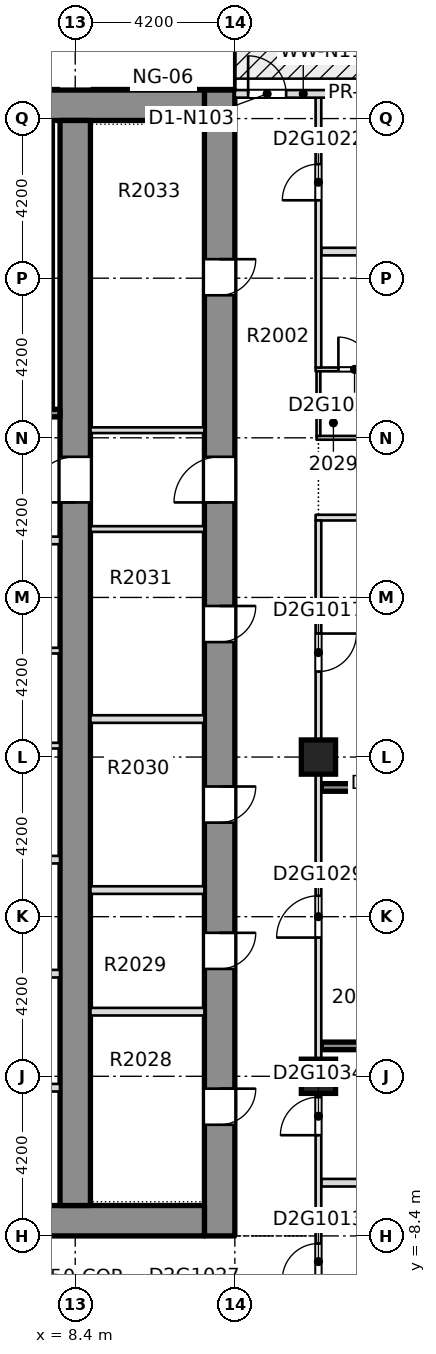
"""IFC4 building model, lengths in metres.
Left out: names, types, materials, properties, quantities, classifications, styles, units other than length and angle.
Written with IfcOpenShell. Run it as: python <this file> out.ifc"""

import sys

from ifc_helpers import new_model, si_unit, direction, frame, frame_2d, origin, origin_2d, place, context, subcontext, project, spatial, rectangle, extrude, element, fill, save


model = new_model("IFC4")
c1 = context("Model", 3, precision=1e-05, world=origin(), true_north=direction((0.0, 1.0)))
c2 = subcontext(c1, "Body", "Model", "MODEL_VIEW")
j1 = project(units=[si_unit("LENGTHUNIT", "METRE"), si_unit("PLANEANGLEUNIT", "RADIAN")], contexts=[c1])
p1 = place(None, origin())
s1 = spatial("IfcSite", under=j1, at=p1, CompositionType="ELEMENT")
p2 = place(p1, origin())
s2 = spatial("IfcBuilding", under=s1, at=p2, CompositionType="ELEMENT")
p3 = place(p2, frame((0.0, 0.0, 83.85)))
s3 = spatial("IfcBuildingStorey", under=s2, at=p3, CompositionType="ELEMENT", Elevation=83.85)
p4 = place(p3, frame((12.2, -8.4, -0.32), z_axis=(0.0, 0.0, 1.0), x_axis=(0.0, 1.0, 0.0)))
e1 = element("IfcWall", 1, at=p4, inside=s3, PredefinedType="SHEAR", context=c2, shape_type="SweptSolid", body=[
    extrude(rectangle(XDim=30.15, YDim=0.8, at=frame_2d((15.075, 0.0))), origin(), (0.0, 0.0, 1.0), 3.45),
])
p5 = place(p4, frame((2.925, 0.0, 0.32)))
e2 = element("IfcOpeningElement", 2, at=p5, cuts=e1, PredefinedType="OPENING", context=c2, shape_type="SweptSolid", body=[
    extrude(rectangle(XDim=0.95, YDim=2.1, at=frame_2d((0.475, 1.05))), frame((0.0, 0.41, 0.0), z_axis=(0.0, -1.0, 0.0), x_axis=(1.0, 0.0, 0.0)), (0.0, 0.0, 1.0), 0.82),
])
p6 = place(p4, frame((7.025, 0.0, 0.32)))
e3 = element("IfcOpeningElement", 3, at=p6, cuts=e1, PredefinedType="OPENING", context=c2, shape_type="SweptSolid", body=[
    extrude(rectangle(XDim=0.95, YDim=2.1, at=frame_2d((0.475, 1.05))), frame((0.0, 0.41, 0.0), z_axis=(0.0, -1.0, 0.0), x_axis=(1.0, 0.0, 0.0)), (0.0, 0.0, 1.0), 0.82),
])
p7 = place(p4, frame((10.875, 0.0, 0.32)))
e4 = element("IfcOpeningElement", 4, at=p7, cuts=e1, PredefinedType="OPENING", context=c2, shape_type="SweptSolid", body=[
    extrude(rectangle(XDim=0.95, YDim=2.1, at=frame_2d((0.475, 1.05))), frame((0.0, 0.41, 0.0), z_axis=(0.0, -1.0, 0.0), x_axis=(1.0, 0.0, 0.0)), (0.0, 0.0, 1.0), 0.82),
])
p8 = place(p4, frame((15.625, 0.0, 0.32)))
e5 = element("IfcOpeningElement", 5, at=p8, cuts=e1, PredefinedType="OPENING", context=c2, shape_type="SweptSolid", body=[
    extrude(rectangle(XDim=0.95, YDim=2.1, at=frame_2d((0.475, 1.05))), frame((0.0, 0.41, 0.0), z_axis=(0.0, -1.0, 0.0), x_axis=(1.0, 0.0, 0.0)), (0.0, 0.0, 1.0), 0.82),
])
p9 = place(p4, frame((24.75, 0.0, 0.32)))
e6 = element("IfcOpeningElement", 6, at=p9, cuts=e1, PredefinedType="OPENING", context=c2, shape_type="SweptSolid", body=[
    extrude(rectangle(XDim=0.95, YDim=2.1, at=frame_2d((0.475, 1.05))), frame((0.0, 0.41, 0.0), z_axis=(0.0, -1.0, 0.0), x_axis=(1.0, 0.0, 0.0)), (0.0, 0.0, 1.0), 0.82),
])
p10 = place(p4, frame((19.3, 0.0, 0.32)))
e7 = element("IfcOpeningElement", 7, at=p10, cuts=e1, PredefinedType="OPENING", context=c2, shape_type="SweptSolid", body=[
    extrude(rectangle(XDim=1.2, YDim=2.1, at=frame_2d((0.6, 1.05))), frame((0.0, 0.41, 0.0), z_axis=(0.0, -1.0, 0.0), x_axis=(1.0, 0.0, 0.0)), (0.0, 0.0, 1.0), 0.82),
])
p11 = place(p3, frame((-11.8, -8.0, -0.32), z_axis=(0.0, 0.0, 1.0), x_axis=(1.0, 0.0, 0.0)))
e8 = element("IfcWall", 8, at=p11, inside=s3, PredefinedType="SHEAR", context=c2, shape_type="SweptSolid", body=[
    extrude(rectangle(XDim=23.6, YDim=0.8, at=frame_2d((11.8, 0.0))), origin(), (0.0, 0.0, 1.0), 3.45),
])
p12 = place(p11, frame((7.05, 0.0, 0.32)))
e9 = element("IfcOpeningElement", 9, at=p12, cuts=e8, PredefinedType="OPENING", context=c2, shape_type="SweptSolid", body=[
    extrude(rectangle(XDim=1.8, YDim=2.1, at=frame_2d((0.9, 1.05))), frame((0.0, 0.41, 0.0), z_axis=(0.0, -1.0, 0.0), x_axis=(1.0, 0.0, 0.0)), (0.0, 0.0, 1.0), 0.82),
])
p13 = place(p11, frame((14.75, 0.0, 0.32)))
e10 = element("IfcOpeningElement", 10, at=p13, cuts=e8, PredefinedType="OPENING", context=c2, shape_type="SweptSolid", body=[
    extrude(rectangle(XDim=1.8, YDim=2.1, at=frame_2d((0.9, 1.05))), frame((0.0, 0.41, 0.0), z_axis=(0.0, -1.0, 0.0), x_axis=(1.0, 0.0, 0.0)), (0.0, 0.0, 1.0), 0.82),
])
p14 = place(p3, frame((-11.8, 21.35, -0.32), z_axis=(0.0, 0.0, 1.0), x_axis=(1.0, 0.0, 0.0)))
e11 = element("IfcWall", 11, at=p14, inside=s3, PredefinedType="SHEAR", context=c2, shape_type="SweptSolid", body=[
    extrude(rectangle(XDim=23.6, YDim=0.8, at=frame_2d((11.8, 0.0))), origin(), (0.0, 0.0, 1.0), 3.45),
])
p15 = place(p3, frame((8.4, -7.6, -0.32), z_axis=(0.0, 0.0, 1.0), x_axis=(0.0, 1.0, 0.0)))
e12 = element("IfcWall", 12, at=p15, inside=s3, PredefinedType="SHEAR", context=c2, shape_type="SweptSolid", body=[
    extrude(rectangle(XDim=28.55, YDim=0.8, at=frame_2d((14.275, 0.0))), origin(), (0.0, 0.0, 1.0), 3.45),
])
p16 = place(p15, frame((18.5, 0.0, 0.32)))
e13 = element("IfcOpeningElement", 13, at=p16, cuts=e12, PredefinedType="OPENING", context=c2, shape_type="SweptSolid", body=[
    extrude(rectangle(XDim=1.2, YDim=2.1, at=frame_2d((0.6, 1.05))), frame((0.0, 0.41, 0.0), z_axis=(0.0, -1.0, 0.0), x_axis=(1.0, 0.0, 0.0)), (0.0, 0.0, 1.0), 0.82),
])
for number, where, z_axis, x_axis in (
    (14, (14.8, -4.2, -0.32), (0.0, 0.0, 1.0), (1.0, 0.0, 0.0)),
    (15, (14.8, 4.2, -0.32), (0.0, 0.0, 1.0), (1.0, 0.0, 0.0)),
):
    element("IfcColumn", number, at=place(p3, frame(where, z_axis=z_axis, x_axis=x_axis)), inside=s3, PredefinedType="COLUMN", context=c2, shape_type="SweptSolid", body=[
        extrude(rectangle(XDim=0.9, YDim=0.9, at=origin_2d()), origin(), (0.0, 0.0, 1.0), 3.45),
    ])
p17 = place(p3, frame((14.875, -7.0, 0.0), z_axis=(0.0, 0.0, 1.0), x_axis=(1.0, 0.0, 0.0)))
e16 = element("IfcWall", 16, at=p17, inside=s3, PredefinedType="PARTITIONING", context=c2, shape_type="SweptSolid", body=[
    extrude(rectangle(XDim=10.875, YDim=0.2, at=frame_2d((5.438, 0.0))), origin(), (0.0, 0.0, 1.0), 3.13),
])
p18 = place(p3, frame((14.875, -3.4, 0.0), z_axis=(0.0, 0.0, 1.0), x_axis=(1.0, 0.0, 0.0)))
e17 = element("IfcWall", 17, at=p18, inside=s3, PredefinedType="SOLIDWALL", context=c2, shape_type="SweptSolid", body=[
    extrude(rectangle(XDim=5.525, YDim=0.2, at=frame_2d((2.762, 0.0))), origin(), (0.0, 0.0, 1.0), 3.13),
])
p19 = place(p3, frame((14.875, 3.4, 0.0), z_axis=(0.0, 0.0, 1.0), x_axis=(1.0, 0.0, 0.0)))
e18 = element("IfcWall", 18, at=p19, inside=s3, PredefinedType="SOLIDWALL", context=c2, shape_type="SweptSolid", body=[
    extrude(rectangle(XDim=5.575, YDim=0.2, at=frame_2d((2.788, 0.0))), origin(), (0.0, 0.0, 1.0), 3.13),
])
p20 = place(p3, frame((14.725, 10.5, 0.0), z_axis=(0.0, 0.0, 1.0), x_axis=(1.0, 0.0, 0.0)))
e19 = element("IfcWall", 19, at=p20, inside=s3, PredefinedType="PARTITIONING", context=c2, shape_type="SweptSolid", body=[
    extrude(rectangle(XDim=11.025, YDim=0.15, at=frame_2d((5.512, 0.0))), origin(), (0.0, 0.0, 1.0), 3.13),
])
p21 = place(p3, frame((14.75, 12.6, 0.0), z_axis=(0.0, 0.0, 1.0), x_axis=(1.0, 0.0, 0.0)))
e20 = element("IfcWall", 20, at=p21, inside=s3, PredefinedType="PARTITIONING", context=c2, shape_type="SweptSolid", body=[
    extrude(rectangle(XDim=2.5, YDim=0.1, at=frame_2d((1.25, 0.0))), origin(), (0.0, 0.0, 1.0), 3.13),
])
p22 = place(p3, frame((14.725, 14.4, 0.0), z_axis=(0.0, 0.0, 1.0), x_axis=(1.0, 0.0, 0.0)))
e21 = element("IfcWall", 21, at=p22, inside=s3, PredefinedType="PARTITIONING", context=c2, shape_type="SweptSolid", body=[
    extrude(rectangle(XDim=2.525, YDim=0.1, at=frame_2d((1.262, 0.0))), origin(), (0.0, 0.0, 1.0), 3.13),
])
p23 = place(p22, frame((0.6, 0.0, 0.0)))
e22 = element("IfcOpeningElement", 22, at=p23, cuts=e21, PredefinedType="OPENING", context=c2, shape_type="SweptSolid", body=[
    extrude(rectangle(XDim=0.85, YDim=2.1, at=frame_2d((0.425, 1.05))), frame((0.0, 0.06, 0.0), z_axis=(0.0, -1.0, 0.0), x_axis=(1.0, 0.0, 0.0)), (0.0, 0.0, 1.0), 0.12),
])
p24 = place(p3, frame((14.875, 17.5, 0.0), z_axis=(0.0, 0.0, 1.0), x_axis=(1.0, 0.0, 0.0)))
e23 = element("IfcWall", 23, at=p24, inside=s3, PredefinedType="PARTITIONING", context=c2, shape_type="SweptSolid", body=[
    extrude(rectangle(XDim=2.475, YDim=0.2, at=frame_2d((1.238, 0.0))), origin(), (0.0, 0.0, 1.0), 3.13),
])
p25 = place(p3, frame((14.8, -10.45, 0.0), z_axis=(0.0, 0.0, 1.0), x_axis=(0.0, 1.0, 0.0)))
e24 = element("IfcWall", 24, at=p25, inside=s3, PredefinedType="PARTITIONING", context=c2, shape_type="SweptSolid", body=[
    extrude(rectangle(XDim=20.875, YDim=0.15, at=frame_2d((10.438, 0.0))), origin(), (0.0, 0.0, 1.0), 3.13),
])
p26 = place(p25, frame((0.9, 0.0, 0.0)))
e25 = element("IfcOpeningElement", 25, at=p26, cuts=e24, PredefinedType="OPENING", context=c2, shape_type="SweptSolid", body=[
    extrude(rectangle(XDim=0.95, YDim=2.1, at=frame_2d((0.475, 1.05))), frame((0.0, 0.085, 0.0), z_axis=(0.0, -1.0, 0.0), x_axis=(1.0, 0.0, 0.0)), (0.0, 0.0, 1.0), 0.17),
])
p27 = place(p25, frame((16.9, 0.0, 0.0)))
e26 = element("IfcOpeningElement", 26, at=p27, cuts=e24, PredefinedType="OPENING", context=c2, shape_type="SweptSolid", body=[
    extrude(rectangle(XDim=1.0, YDim=2.1, at=frame_2d((0.5, 1.05))), frame((0.0, 0.085, 0.0), z_axis=(0.0, -1.0, 0.0), x_axis=(1.0, 0.0, 0.0)), (0.0, 0.0, 1.0), 0.17),
])
p28 = place(p25, frame((9.9, 0.0, 0.0)))
e27 = element("IfcOpeningElement", 27, at=p28, cuts=e24, PredefinedType="OPENING", context=c2, shape_type="SweptSolid", body=[
    extrude(rectangle(XDim=1.1, YDim=2.1, at=frame_2d((0.55, 1.05))), frame((0.0, 0.085, 0.0), z_axis=(0.0, -1.0, 0.0), x_axis=(1.0, 0.0, 0.0)), (0.0, 0.0, 1.0), 0.17),
])
p29 = place(p25, frame((4.7, 0.0, 0.0)))
e28 = element("IfcOpeningElement", 28, at=p29, cuts=e24, PredefinedType="OPENING", context=c2, shape_type="SweptSolid", body=[
    extrude(rectangle(XDim=1.0, YDim=2.1, at=frame_2d((0.5, 1.05))), frame((0.0, 0.085, 0.0), z_axis=(0.0, -1.0, 0.0), x_axis=(1.0, 0.0, 0.0)), (0.0, 0.0, 1.0), 0.17),
])
p30 = place(p3, frame((14.8, 12.65, 0.0), z_axis=(0.0, 0.0, 1.0), x_axis=(0.0, 1.0, 0.0)))
e29 = element("IfcWall", 29, at=p30, inside=s3, PredefinedType="PARTITIONING", context=c2, shape_type="SweptSolid", body=[
    extrude(rectangle(XDim=1.7, YDim=0.1, at=frame_2d((0.85, 0.0))), origin(), (0.0, 0.0, 1.0), 3.13),
])
p31 = place(p3, frame((14.8, 14.45, 0.0), z_axis=(0.0, 0.0, 1.0), x_axis=(0.0, 1.0, 0.0)))
e30 = element("IfcWall", 30, at=p31, inside=s3, PredefinedType="PARTITIONING", context=c2, shape_type="SweptSolid", body=[
    extrude(rectangle(XDim=7.1, YDim=0.15, at=frame_2d((3.55, 0.0))), origin(), (0.0, 0.0, 1.0), 3.13),
])
p32 = place(p31, frame((4.4, 0.0, 0.0)))
e31 = element("IfcOpeningElement", 31, at=p32, cuts=e30, PredefinedType="OPENING", context=c2, shape_type="SweptSolid", body=[
    extrude(rectangle(XDim=0.95, YDim=2.1, at=frame_2d((0.475, 1.05))), frame((0.0, 0.085, 0.0), z_axis=(0.0, -1.0, 0.0), x_axis=(1.0, 0.0, 0.0)), (0.0, 0.0, 1.0), 0.17),
])
p33 = place(p3, frame((16.2, 21.65, 0.0), z_axis=(0.0, 0.0, 1.0), x_axis=(-1.0, 0.0, 0.0)))
e32 = element("IfcWall", 32, at=p33, inside=s3, PredefinedType="STANDARD", context=c2, shape_type="SweptSolid", body=[
    extrude(rectangle(XDim=3.6, YDim=0.2, at=frame_2d((1.8, 0.0))), origin(), (0.0, 0.0, 1.0), 3.13),
])
p34 = place(p33, frame((2.25, 0.0, 0.0)))
e33 = element("IfcOpeningElement", 33, at=p34, cuts=e32, PredefinedType="OPENING", context=c2, shape_type="SweptSolid", body=[
    extrude(rectangle(XDim=1.0, YDim=2.4, at=frame_2d((0.5, 1.2))), frame((0.0, 0.11, 0.0), z_axis=(0.0, -1.0, 0.0), x_axis=(1.0, 0.0, 0.0)), (0.0, 0.0, 1.0), 0.22),
])
for number, where, z_axis, x_axis in (
    (34, (5.575, -4.5, 0.0), (0.0, 0.0, 1.0), (1.0, 0.0, 0.0)),
    (35, (5.575, -1.5, 0.0), (0.0, 0.0, 1.0), (1.0, 0.0, 0.0)),
    (36, (5.575, 1.5, 0.0), (0.0, 0.0, 1.0), (1.0, 0.0, 0.0)),
):
    element("IfcWall", number, at=place(p3, frame(where, z_axis=z_axis, x_axis=x_axis)), inside=s3, PredefinedType="PARTITIONING", context=c2, shape_type="SweptSolid", body=[
        extrude(rectangle(XDim=2.424, YDim=0.2, at=frame_2d((1.212, 0.0))), origin(), (0.0, 0.0, 1.0), 3.13),
    ])
p35 = place(p3, frame((5.425, 4.5, 0.0), z_axis=(0.0, 0.0, 1.0), x_axis=(1.0, 0.0, 0.0)))
e37 = element("IfcWall", 37, at=p35, inside=s3, PredefinedType="PARTITIONING", context=c2, shape_type="SweptSolid", body=[
    extrude(rectangle(XDim=2.574, YDim=0.15, at=frame_2d((1.287, 0.0))), origin(), (0.0, 0.0, 1.0), 3.13),
])
p36 = place(p3, frame((-7.999, 7.0, 0.0), z_axis=(0.0, 0.0, 1.0), x_axis=(1.0, 0.0, 0.0)))
e38 = element("IfcWall", 38, at=p36, inside=s3, PredefinedType="PARTITIONING", context=c2, shape_type="SweptSolid", body=[
    extrude(rectangle(XDim=15.998, YDim=0.15, at=frame_2d((7.999, 0.0))), origin(), (0.0, 0.0, 1.0), 3.13),
])
p37 = place(p36, frame((7.299, 0.0, 0.0)))
e39 = element("IfcOpeningElement", 39, at=p37, cuts=e38, PredefinedType="OPENING", context=c2, shape_type="SweptSolid", body=[
    extrude(rectangle(XDim=1.4, YDim=2.1, at=frame_2d((0.7, 1.05))), frame((0.0, 0.085, 0.0), z_axis=(0.0, -1.0, 0.0), x_axis=(1.0, 0.0, 0.0)), (0.0, 0.0, 1.0), 0.17),
])
p38 = place(p3, frame((3.6, 9.9, 0.0), z_axis=(0.0, 0.0, 1.0), x_axis=(1.0, 0.0, 0.0)))
e40 = element("IfcWall", 40, at=p38, inside=s3, PredefinedType="PARTITIONING", context=c2, shape_type="SweptSolid", body=[
    extrude(rectangle(XDim=4.399, YDim=0.2, at=frame_2d((2.199, 0.0))), origin(), (0.0, 0.0, 1.0), 3.13),
])
p39 = place(p38, frame((2.25, 0.0, 0.0)))
e41 = element("IfcOpeningElement", 41, at=p39, cuts=e40, PredefinedType="OPENING", context=c2, shape_type="SweptSolid", body=[
    extrude(rectangle(XDim=1.1, YDim=2.1, at=frame_2d((0.55, 1.05))), frame((0.0, 0.11, 0.0), z_axis=(0.0, -1.0, 0.0), x_axis=(1.0, 0.0, 0.0)), (0.0, 0.0, 1.0), 0.22),
])
p40 = place(p3, frame((3.425, 13.25, 0.0), z_axis=(0.0, 0.0, 1.0), x_axis=(1.0, 0.0, 0.0)))
e42 = element("IfcWall", 42, at=p40, inside=s3, PredefinedType="SOLIDWALL", context=c2, shape_type="SweptSolid", body=[
    extrude(rectangle(XDim=4.574, YDim=0.2, at=frame_2d((2.287, 0.0))), origin(), (0.0, 0.0, 1.0), 3.13),
])
p41 = place(p40, frame((1.825, 0.0, 0.0)))
e43 = element("IfcOpeningElement", 43, at=p41, cuts=e42, PredefinedType="OPENING", context=c2, shape_type="SweptSolid", body=[
    extrude(rectangle(XDim=1.2, YDim=2.1, at=frame_2d((0.6, 1.05))), frame((0.0, 0.11, 0.0), z_axis=(0.0, -1.0, 0.0), x_axis=(1.0, 0.0, 0.0)), (0.0, 0.0, 1.0), 0.22),
])
for number, where, z_axis, x_axis in (
    (44, (8.801, -2.5, 0.0), (0.0, 0.0, 1.0), (1.0, 0.0, 0.0)),
    (45, (8.801, 0.7, 0.0), (0.0, 0.0, 1.0), (1.0, 0.0, 0.0)),
    (46, (8.801, 5.2, 0.0), (0.0, 0.0, 1.0), (1.0, 0.0, 0.0)),
):
    element("IfcWall", number, at=place(p3, frame(where, z_axis=z_axis, x_axis=x_axis)), inside=s3, PredefinedType="PARTITIONING", context=c2, shape_type="SweptSolid", body=[
        extrude(rectangle(XDim=2.998, YDim=0.2, at=frame_2d((1.499, 0.0))), origin(), (0.0, 0.0, 1.0), 3.13),
    ])
for number, where, z_axis, x_axis in (
    (47, (8.801, 10.2, 0.0), (0.0, 0.0, 1.0), (1.0, 0.0, 0.0)),
    (48, (8.801, 12.8, 0.0), (0.0, 0.0, 1.0), (1.0, 0.0, 0.0)),
):
    element("IfcWall", number, at=place(p3, frame(where, z_axis=z_axis, x_axis=x_axis)), inside=s3, PredefinedType="PARTITIONING", context=c2, shape_type="SweptSolid", body=[
        extrude(rectangle(XDim=2.998, YDim=0.15, at=frame_2d((1.499, 0.0))), origin(), (0.0, 0.0, 1.0), 3.13),
    ])
p42 = place(p26, origin())
e49 = element("IfcDoor", 49, at=p42, inside=s3, OperationType="SINGLE_SWING_RIGHT", PredefinedType="DOOR", context=c2, shape_type="SweptSolid", body=[
    extrude(rectangle(XDim=0.95, YDim=2.1, at=frame_2d((0.475, 1.05))), frame((0.0, 0.025, 0.0), z_axis=(0.0, -1.0, 0.0), x_axis=(1.0, 0.0, 0.0)), (0.0, 0.0, 1.0), 0.05),
])
fill(e25, e49)
p43 = place(p27, origin())
e50 = element("IfcDoor", 50, at=p43, inside=s3, OperationType="SINGLE_SWING_RIGHT", PredefinedType="DOOR", context=c2, shape_type="SweptSolid", body=[
    extrude(rectangle(XDim=1.0, YDim=2.1, at=frame_2d((0.5, 1.05))), frame((0.0, 0.025, 0.0), z_axis=(0.0, -1.0, 0.0), x_axis=(1.0, 0.0, 0.0)), (0.0, 0.0, 1.0), 0.05),
])
fill(e26, e50)
p44 = place(p23, origin())
e51 = element("IfcDoor", 51, at=p44, inside=s3, OperationType="SINGLE_SWING_RIGHT", PredefinedType="DOOR", context=c2, shape_type="SweptSolid", body=[
    extrude(rectangle(XDim=0.85, YDim=2.1, at=frame_2d((0.425, 1.05))), frame((0.0, 0.025, 0.0), z_axis=(0.0, -1.0, 0.0), x_axis=(1.0, 0.0, 0.0)), (0.0, 0.0, 1.0), 0.05),
])
fill(e22, e51)
p45 = place(p32, origin())
e52 = element("IfcDoor", 52, at=p45, inside=s3, OperationType="SINGLE_SWING_RIGHT", PredefinedType="DOOR", context=c2, shape_type="SweptSolid", body=[
    extrude(rectangle(XDim=0.95, YDim=2.1, at=frame_2d((0.475, 1.05))), frame((0.0, 0.025, 0.0), z_axis=(0.0, -1.0, 0.0), x_axis=(1.0, 0.0, 0.0)), (0.0, 0.0, 1.0), 0.05),
])
fill(e31, e52)
p46 = place(p28, origin())
e53 = element("IfcDoor", 53, at=p46, inside=s3, OperationType="SINGLE_SWING_LEFT", PredefinedType="DOOR", context=c2, shape_type="SweptSolid", body=[
    extrude(rectangle(XDim=1.1, YDim=2.1, at=frame_2d((0.55, 1.05))), frame((0.0, 0.025, 0.0), z_axis=(0.0, -1.0, 0.0), x_axis=(1.0, 0.0, 0.0)), (0.0, 0.0, 1.0), 0.05),
])
fill(e27, e53)
p47 = place(p29, origin())
e54 = element("IfcDoor", 54, at=p47, inside=s3, OperationType="SINGLE_SWING_RIGHT", PredefinedType="DOOR", context=c2, shape_type="SweptSolid", body=[
    extrude(rectangle(XDim=1.0, YDim=2.1, at=frame_2d((0.5, 1.05))), frame((0.0, 0.025, 0.0), z_axis=(0.0, -1.0, 0.0), x_axis=(1.0, 0.0, 0.0)), (0.0, 0.0, 1.0), 0.05),
])
fill(e28, e54)
p48 = place(p34, origin())
e55 = element("IfcDoor", 55, at=p48, inside=s3, OperationType="SINGLE_SWING_LEFT", PredefinedType="DOOR", context=c2, shape_type="SweptSolid", body=[
    extrude(rectangle(XDim=1.0, YDim=2.4, at=frame_2d((0.5, 1.2))), frame((0.0, 0.025, 0.0), z_axis=(0.0, -1.0, 0.0), x_axis=(1.0, 0.0, 0.0)), (0.0, 0.0, 1.0), 0.05),
])
fill(e33, e55)
p49 = place(p5, origin())
e56 = element("IfcDoor", 56, at=p49, inside=s3, OperationType="SINGLE_SWING_LEFT", PredefinedType="DOOR", context=c2, shape_type="SweptSolid", body=[
    extrude(rectangle(XDim=0.95, YDim=2.1, at=frame_2d((0.475, 1.05))), frame((0.0, 0.025, 0.0), z_axis=(0.0, -1.0, 0.0), x_axis=(1.0, 0.0, 0.0)), (0.0, 0.0, 1.0), 0.05),
])
fill(e2, e56)
p50 = place(p6, origin())
e57 = element("IfcDoor", 57, at=p50, inside=s3, OperationType="SINGLE_SWING_LEFT", PredefinedType="DOOR", context=c2, shape_type="SweptSolid", body=[
    extrude(rectangle(XDim=0.95, YDim=2.1, at=frame_2d((0.475, 1.05))), frame((0.0, 0.025, 0.0), z_axis=(0.0, -1.0, 0.0), x_axis=(1.0, 0.0, 0.0)), (0.0, 0.0, 1.0), 0.05),
])
fill(e3, e57)
p51 = place(p7, origin())
e58 = element("IfcDoor", 58, at=p51, inside=s3, OperationType="SINGLE_SWING_LEFT", PredefinedType="DOOR", context=c2, shape_type="SweptSolid", body=[
    extrude(rectangle(XDim=0.95, YDim=2.1, at=frame_2d((0.475, 1.05))), frame((0.0, 0.025, 0.0), z_axis=(0.0, -1.0, 0.0), x_axis=(1.0, 0.0, 0.0)), (0.0, 0.0, 1.0), 0.05),
])
fill(e4, e58)
p52 = place(p8, origin())
e59 = element("IfcDoor", 59, at=p52, inside=s3, OperationType="SINGLE_SWING_LEFT", PredefinedType="DOOR", context=c2, shape_type="SweptSolid", body=[
    extrude(rectangle(XDim=0.95, YDim=2.1, at=frame_2d((0.475, 1.05))), frame((0.0, 0.025, 0.0), z_axis=(0.0, -1.0, 0.0), x_axis=(1.0, 0.0, 0.0)), (0.0, 0.0, 1.0), 0.05),
])
fill(e5, e59)
p53 = place(p9, origin())
e60 = element("IfcDoor", 60, at=p53, inside=s3, OperationType="SINGLE_SWING_LEFT", PredefinedType="DOOR", context=c2, shape_type="SweptSolid", body=[
    extrude(rectangle(XDim=0.95, YDim=2.1, at=frame_2d((0.475, 1.05))), frame((0.0, 0.025, 0.0), z_axis=(0.0, -1.0, 0.0), x_axis=(1.0, 0.0, 0.0)), (0.0, 0.0, 1.0), 0.05),
])
fill(e6, e60)
p54 = place(p10, origin())
e61 = element("IfcDoor", 61, at=p54, inside=s3, OperationType="SINGLE_SWING_LEFT", PredefinedType="DOOR", context=c2, shape_type="SweptSolid", body=[
    extrude(rectangle(XDim=1.2, YDim=2.1, at=frame_2d((0.6, 1.05))), frame((0.0, 0.025, 0.0), z_axis=(0.0, -1.0, 0.0), x_axis=(1.0, 0.0, 0.0)), (0.0, 0.0, 1.0), 0.05),
])
fill(e7, e61)
p55 = place(p16, origin())
e62 = element("IfcDoor", 62, at=p55, inside=s3, OperationType="SINGLE_SWING_LEFT", PredefinedType="DOOR", context=c2, shape_type="SweptSolid", body=[
    extrude(rectangle(XDim=1.2, YDim=2.1, at=frame_2d((0.6, 1.05))), frame((0.0, 0.025, 0.0), z_axis=(0.0, -1.0, 0.0), x_axis=(1.0, 0.0, 0.0)), (0.0, 0.0, 1.0), 0.05),
])
fill(e13, e62)
save(model, sys.argv[1])
